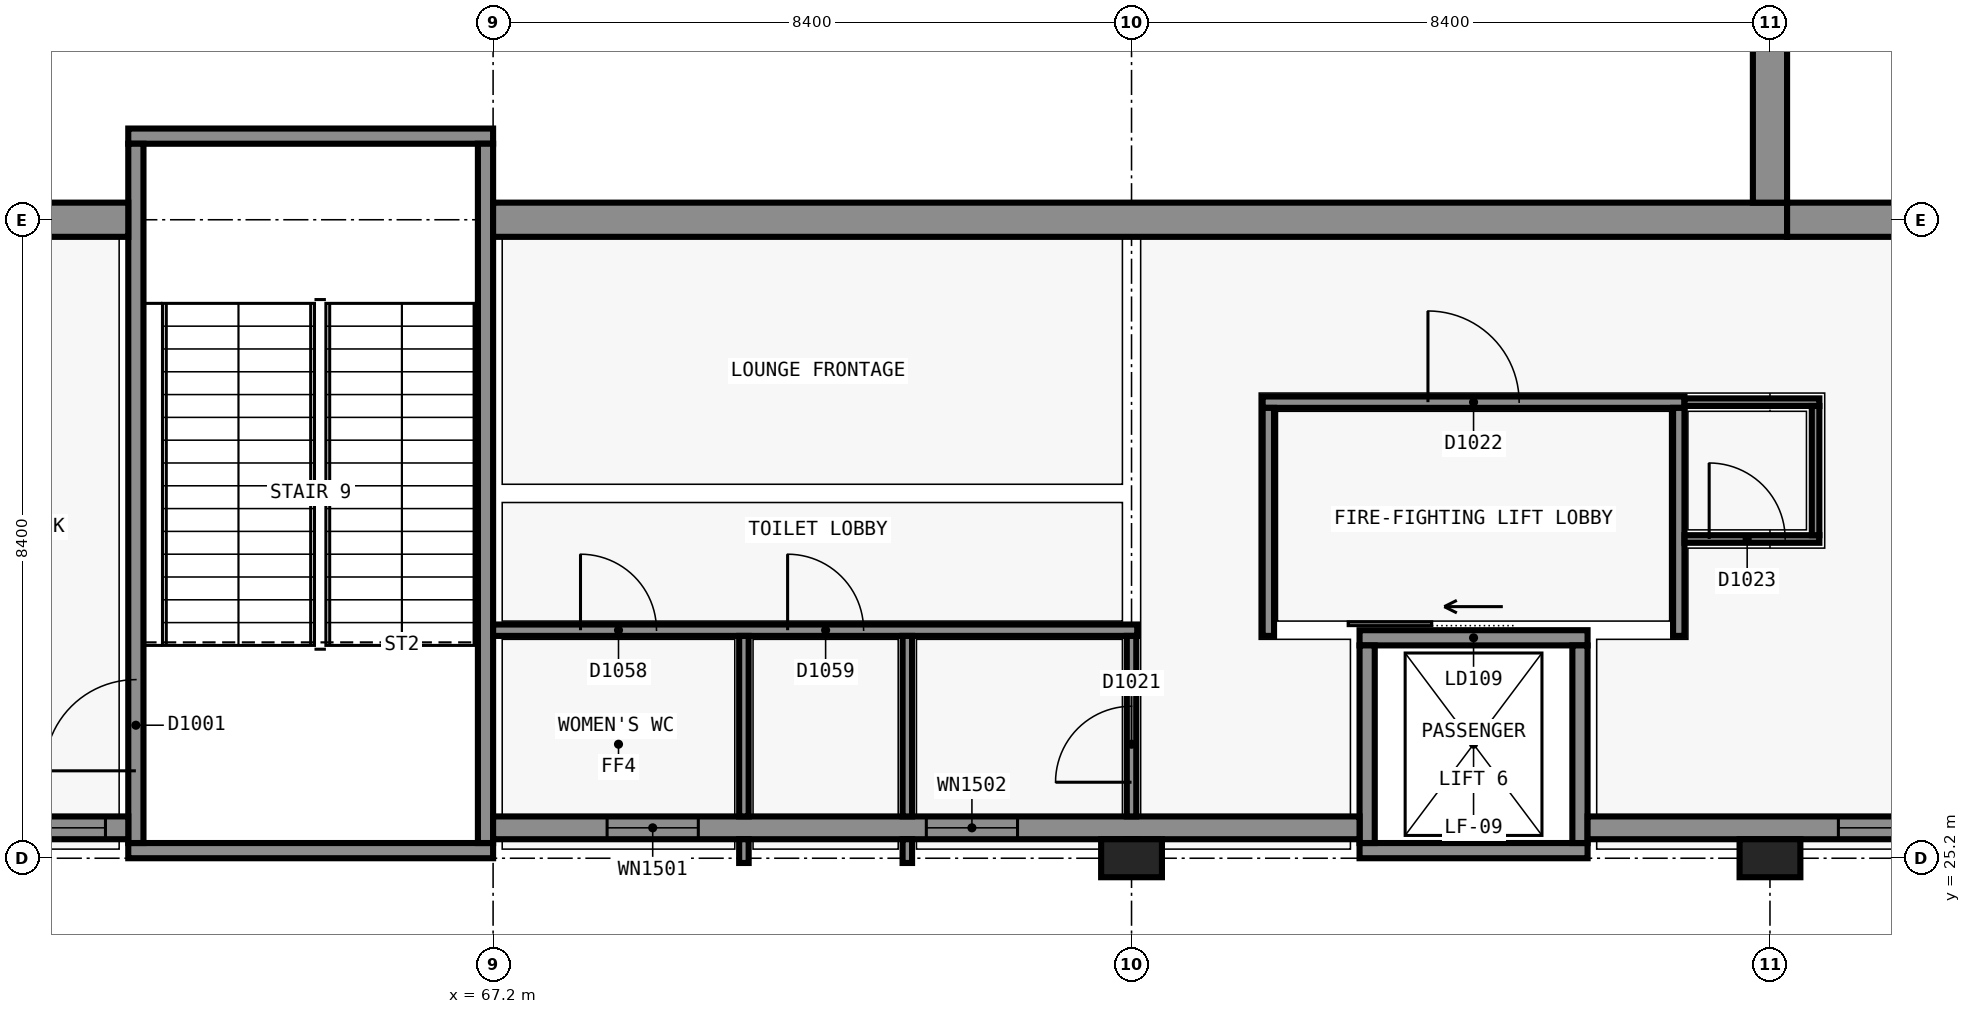
"""IFC4 building model, lengths in metres.
Left out: names, types, materials, properties, quantities, classifications, styles, units other than length and angle.
Written with IfcOpenShell. Run it as: python <this file> out.ifc"""

import sys

from ifc_helpers import new_model, si_unit, direction, frame, frame_2d, origin, origin_2d, place, context, subcontext, project, spatial, rectangle, extrude, element, fill, save


model = new_model("IFC4")
c1 = context("Model", 3, precision=1e-05, world=origin(), true_north=direction((0.0, 1.0)))
c2 = subcontext(c1, "Body", "Model", "MODEL_VIEW")
j1 = project(units=[si_unit("LENGTHUNIT", "METRE"), si_unit("PLANEANGLEUNIT", "RADIAN")], contexts=[c1])
p1 = place(None, origin())
s1 = spatial("IfcSite", under=j1, at=p1, CompositionType="ELEMENT")
p2 = place(p1, origin())
s2 = spatial("IfcBuilding", under=s1, at=p2, CompositionType="ELEMENT")
p3 = place(p2, frame((0.0, 0.0, 5.4)))
s3 = spatial("IfcBuildingStorey", under=s2, at=p3, CompositionType="ELEMENT", Elevation=5.4)
for number, where, z_axis, x_axis in (
    (1, (67.2, 25.3, 0.0), (0.0, 0.0, 1.0), (-1.0, 0.0, 0.0)),
    (2, (62.4, 34.7, 0.0), (0.0, 0.0, 1.0), (1.0, 0.0, 0.0)),
):
    element("IfcWall", number, at=place(p3, frame(where, z_axis=z_axis, x_axis=x_axis)), inside=s3, PredefinedType="SHEAR", context=c2, shape_type="SweptSolid", body=[
        extrude(rectangle(XDim=4.8, YDim=0.2, at=frame_2d((2.4, 0.0))), origin(), (0.0, 0.0, 1.0), 4.8),
    ])
p4 = place(p3, frame((62.5, 25.4, 0.0), z_axis=(0.0, 0.0, 1.0), x_axis=(0.0, 1.0, 0.0)))
e3 = element("IfcWall", 3, at=p4, inside=s3, PredefinedType="SHEAR", context=c2, shape_type="SweptSolid", body=[
    extrude(rectangle(XDim=9.2, YDim=0.2, at=frame_2d((4.6, 0.0))), origin(), (0.0, 0.0, 1.0), 4.8),
])
p5 = place(p4, frame((0.95, 0.0, 0.0)))
e4 = element("IfcOpeningElement", 4, at=p5, cuts=e3, PredefinedType="OPENING", context=c2, shape_type="SweptSolid", body=[
    extrude(rectangle(XDim=1.2, YDim=2.1, at=frame_2d((0.6, 1.05))), frame((0.0, 0.11, 0.0), z_axis=(0.0, -1.0, 0.0), x_axis=(1.0, 0.0, 0.0)), (0.0, 0.0, 1.0), 0.22),
])
p6 = place(p3, frame((67.1, 34.6, 0.0), z_axis=(0.0, 0.0, 1.0), x_axis=(0.0, -1.0, 0.0)))
e5 = element("IfcWall", 5, at=p6, inside=s3, PredefinedType="SHEAR", context=c2, shape_type="SweptSolid", body=[
    extrude(rectangle(XDim=9.2, YDim=0.2, at=frame_2d((4.6, 0.0))), origin(), (0.0, 0.0, 1.0), 4.8),
])
p7 = place(p3, frame((81.6, 25.3, 0.0), z_axis=(0.0, 0.0, 1.0), x_axis=(-1.0, 0.0, 0.0)))
e6 = element("IfcWall", 6, at=p7, inside=s3, PredefinedType="SHEAR", context=c2, shape_type="SweptSolid", body=[
    extrude(rectangle(XDim=3.0, YDim=0.2, at=frame_2d((1.5, 0.0))), origin(), (0.0, 0.0, 1.0), 4.8),
])
p8 = place(p3, frame((78.6, 28.1, 0.0), z_axis=(0.0, 0.0, 1.0), x_axis=(1.0, 0.0, 0.0)))
e7 = element("IfcWall", 7, at=p8, inside=s3, PredefinedType="SHEAR", context=c2, shape_type="SweptSolid", body=[
    extrude(rectangle(XDim=3.0, YDim=0.2, at=frame_2d((1.5, 0.0))), origin(), (0.0, 0.0, 1.0), 4.8),
])
p9 = place(p8, frame((0.95, 0.0, 0.0)))
e8 = element("IfcOpeningElement", 8, at=p9, cuts=e7, PredefinedType="OPENING", context=c2, shape_type="SweptSolid", body=[
    extrude(rectangle(XDim=1.1, YDim=2.1, at=frame_2d((0.55, 1.05))), frame((0.0, 0.11, 0.0), z_axis=(0.0, -1.0, 0.0), x_axis=(1.0, 0.0, 0.0)), (0.0, 0.0, 1.0), 0.22),
])
for number, where, z_axis, x_axis in (
    (9, (78.7, 25.4, 0.0), (0.0, 0.0, 1.0), (0.0, 1.0, 0.0)),
    (10, (81.5, 28.0, 0.0), (0.0, 0.0, 1.0), (0.0, -1.0, 0.0)),
):
    element("IfcWall", number, at=place(p3, frame(where, z_axis=z_axis, x_axis=x_axis)), inside=s3, PredefinedType="SHEAR", context=c2, shape_type="SweptSolid", body=[
        extrude(rectangle(XDim=2.6, YDim=0.2, at=frame_2d((1.3, 0.0))), origin(), (0.0, 0.0, 1.0), 4.8),
    ])
p10 = place(p3, frame((62.4, 33.6, 0.0), z_axis=(0.0, 0.0, 1.0), x_axis=(-1.0, 0.0, 0.0)))
e11 = element("IfcWall", 11, at=p10, inside=s3, PredefinedType="SHEAR", context=c2, shape_type="SweptSolid", body=[
    extrude(rectangle(XDim=3.6, YDim=0.45, at=frame_2d((1.8, 0.0))), origin(), (0.0, 0.0, 1.0), 4.8),
])
p11 = place(p3, frame((84.225, 33.6, 0.0), z_axis=(0.0, 0.0, 1.0), x_axis=(-1.0, 0.0, 0.0)))
e12 = element("IfcWall", 12, at=p11, inside=s3, PredefinedType="SHEAR", context=c2, shape_type="SweptSolid", body=[
    extrude(rectangle(XDim=17.025, YDim=0.45, at=frame_2d((8.513, 0.0))), origin(), (0.0, 0.0, 1.0), 4.8),
])
p12 = place(p3, frame((84.0, 58.575, 0.0), z_axis=(0.0, 0.0, 1.0), x_axis=(0.0, -1.0, 0.0)))
e13 = element("IfcWall", 13, at=p12, inside=s3, PredefinedType="SHEAR", context=c2, shape_type="SweptSolid", body=[
    extrude(rectangle(XDim=24.75, YDim=0.45, at=frame_2d((12.375, 0.0))), origin(), (0.0, 0.0, 1.0), 4.8),
])
p13 = place(p3, frame((96.0, 33.6, 0.0), z_axis=(0.0, 0.0, 1.0), x_axis=(-1.0, 0.0, 0.0)))
e14 = element("IfcWall", 14, at=p13, inside=s3, PredefinedType="SHEAR", context=c2, shape_type="SweptSolid", body=[
    extrude(rectangle(XDim=11.775, YDim=0.45, at=frame_2d((5.887, 0.0))), origin(), (0.0, 0.0, 1.0), 4.8),
])
for number, where, z_axis, x_axis in (
    (15, (75.6, 25.2, 0.0), (0.0, 0.0, 1.0), (1.0, 0.0, 0.0)),
    (16, (84.0, 25.2, 0.0), (0.0, 0.0, 1.0), (1.0, 0.0, 0.0)),
):
    element("IfcColumn", number, at=place(p3, frame(where, z_axis=z_axis, x_axis=x_axis)), inside=s3, PredefinedType="COLUMN", context=c2, shape_type="SweptSolid", body=[
        extrude(rectangle(XDim=0.8, YDim=0.5, at=origin_2d()), origin(), (0.0, 0.0, 1.0), 4.8),
    ])
p14 = place(p3, frame((62.4, 25.6, 0.0), z_axis=(0.0, 0.0, 1.0), x_axis=(-1.0, 0.0, 0.0)))
e17 = element("IfcWall", 17, at=p14, inside=s3, PredefinedType="SOLIDWALL", context=c2, shape_type="SweptSolid", body=[
    extrude(rectangle(XDim=3.2, YDim=0.3, at=frame_2d((1.6, 0.0))), origin(), (0.0, 0.0, 1.0), 4.5),
])
p15 = place(p14, frame((0.3, 0.0, 0.9)))
e18 = element("IfcOpeningElement", 18, at=p15, cuts=e17, PredefinedType="OPENING", context=c2, shape_type="SweptSolid", body=[
    extrude(rectangle(XDim=2.4, YDim=1.8, at=frame_2d((1.2, 0.9))), frame((0.0, 0.16, 0.0), z_axis=(0.0, -1.0, 0.0), x_axis=(1.0, 0.0, 0.0)), (0.0, 0.0, 1.0), 0.32),
])
p16 = place(p3, frame((78.6, 25.6, 0.0), z_axis=(0.0, 0.0, 1.0), x_axis=(-1.0, 0.0, 0.0)))
e19 = element("IfcWall", 19, at=p16, inside=s3, PredefinedType="SOLIDWALL", context=c2, shape_type="SweptSolid", body=[
    extrude(rectangle(XDim=11.4, YDim=0.3, at=frame_2d((5.7, 0.0))), origin(), (0.0, 0.0, 1.0), 4.5),
])
p17 = place(p16, frame((8.7, 0.0, 1.5)))
e20 = element("IfcOpeningElement", 20, at=p17, cuts=e19, PredefinedType="OPENING", context=c2, shape_type="SweptSolid", body=[
    extrude(rectangle(XDim=1.2, YDim=0.9, at=frame_2d((0.6, 0.45))), frame((0.0, 0.16, 0.0), z_axis=(0.0, -1.0, 0.0), x_axis=(1.0, 0.0, 0.0)), (0.0, 0.0, 1.0), 0.32),
])
p18 = place(p16, frame((4.5, 0.0, 1.5)))
e21 = element("IfcOpeningElement", 21, at=p18, cuts=e19, PredefinedType="OPENING", context=c2, shape_type="SweptSolid", body=[
    extrude(rectangle(XDim=1.2, YDim=0.9, at=frame_2d((0.6, 0.45))), frame((0.0, 0.16, 0.0), z_axis=(0.0, -1.0, 0.0), x_axis=(1.0, 0.0, 0.0)), (0.0, 0.0, 1.0), 0.32),
])
p19 = place(p3, frame((96.0, 25.6, 0.0), z_axis=(0.0, 0.0, 1.0), x_axis=(-1.0, 0.0, 0.0)))
e22 = element("IfcWall", 22, at=p19, inside=s3, PredefinedType="SOLIDWALL", context=c2, shape_type="SweptSolid", body=[
    extrude(rectangle(XDim=14.4, YDim=0.3, at=frame_2d((7.2, 0.0))), origin(), (0.0, 0.0, 1.0), 4.5),
])
p20 = place(p19, frame((8.7, 0.0, 0.9)))
e23 = element("IfcOpeningElement", 23, at=p20, cuts=e22, PredefinedType="OPENING", context=c2, shape_type="SweptSolid", body=[
    extrude(rectangle(XDim=2.4, YDim=1.8, at=frame_2d((1.2, 0.9))), frame((0.0, 0.16, 0.0), z_axis=(0.0, -1.0, 0.0), x_axis=(1.0, 0.0, 0.0)), (0.0, 0.0, 1.0), 0.32),
])
p21 = place(p19, frame((4.5, 0.0, 0.9)))
e24 = element("IfcOpeningElement", 24, at=p21, cuts=e22, PredefinedType="OPENING", context=c2, shape_type="SweptSolid", body=[
    extrude(rectangle(XDim=2.4, YDim=1.8, at=frame_2d((1.2, 0.9))), frame((0.0, 0.16, 0.0), z_axis=(0.0, -1.0, 0.0), x_axis=(1.0, 0.0, 0.0)), (0.0, 0.0, 1.0), 0.32),
])
p22 = place(p19, frame((0.3, 0.0, 0.9)))
e25 = element("IfcOpeningElement", 25, at=p22, cuts=e22, PredefinedType="OPENING", context=c2, shape_type="SweptSolid", body=[
    extrude(rectangle(XDim=2.4, YDim=1.8, at=frame_2d((1.2, 0.9))), frame((0.0, 0.16, 0.0), z_axis=(0.0, -1.0, 0.0), x_axis=(1.0, 0.0, 0.0)), (0.0, 0.0, 1.0), 0.32),
])
p23 = place(p3, frame((67.2, 28.2, 0.0), z_axis=(0.0, 0.0, 1.0), x_axis=(1.0, 0.0, 0.0)))
e26 = element("IfcWall", 26, at=p23, inside=s3, PredefinedType="PARTITIONING", context=c2, shape_type="SweptSolid", body=[
    extrude(rectangle(XDim=8.475, YDim=0.15, at=frame_2d((4.237, 0.0))), origin(), (0.0, 0.0, 1.0), 3.8),
])
p24 = place(p23, frame((1.15, 0.0, 0.0)))
e27 = element("IfcOpeningElement", 27, at=p24, cuts=e26, PredefinedType="OPENING", context=c2, shape_type="SweptSolid", body=[
    extrude(rectangle(XDim=1.0, YDim=2.1, at=frame_2d((0.5, 1.05))), frame((0.0, 0.085, 0.0), z_axis=(0.0, -1.0, 0.0), x_axis=(1.0, 0.0, 0.0)), (0.0, 0.0, 1.0), 0.17),
])
p25 = place(p23, frame((3.875, 0.0, 0.0)))
e28 = element("IfcOpeningElement", 28, at=p25, cuts=e26, PredefinedType="OPENING", context=c2, shape_type="SweptSolid", body=[
    extrude(rectangle(XDim=1.0, YDim=2.1, at=frame_2d((0.5, 1.05))), frame((0.0, 0.085, 0.0), z_axis=(0.0, -1.0, 0.0), x_axis=(1.0, 0.0, 0.0)), (0.0, 0.0, 1.0), 0.17),
])
p26 = place(p3, frame((77.325, 31.2, 0.0), z_axis=(0.0, 0.0, 1.0), x_axis=(1.0, 0.0, 0.0)))
e29 = element("IfcWall", 29, at=p26, inside=s3, PredefinedType="SOLIDWALL", context=c2, shape_type="SweptSolid", body=[
    extrude(rectangle(XDim=5.55, YDim=0.15, at=frame_2d((2.775, 0.0))), origin(), (0.0, 0.0, 1.0), 4.5),
])
p27 = place(p26, frame((2.175, 0.0, 0.0)))
e30 = element("IfcOpeningElement", 30, at=p27, cuts=e29, PredefinedType="OPENING", context=c2, shape_type="SweptSolid", body=[
    extrude(rectangle(XDim=1.2, YDim=2.1, at=frame_2d((0.6, 1.05))), frame((0.0, 0.085, 0.0), z_axis=(0.0, -1.0, 0.0), x_axis=(1.0, 0.0, 0.0)), (0.0, 0.0, 1.0), 0.17),
])
for number, where, z_axis, x_axis in (
    (31, (77.4, 28.125, 0.0), (0.0, 0.0, 1.0), (0.0, 1.0, 0.0)),
    (32, (82.8, 28.125, 0.0), (0.0, 0.0, 1.0), (0.0, 1.0, 0.0)),
):
    element("IfcWall", number, at=place(p3, frame(where, z_axis=z_axis, x_axis=x_axis)), inside=s3, PredefinedType="SOLIDWALL", context=c2, shape_type="SweptSolid", body=[
        extrude(rectangle(XDim=3.0, YDim=0.15, at=frame_2d((1.5, 0.0))), origin(), (0.0, 0.0, 1.0), 4.5),
    ])
p28 = place(p3, frame((70.5, 25.137, 0.0), z_axis=(0.0, 0.0, 1.0), x_axis=(0.0, 1.0, 0.0)))
e33 = element("IfcWall", 33, at=p28, inside=s3, PredefinedType="PARTITIONING", context=c2, shape_type="SweptSolid", body=[
    extrude(rectangle(XDim=0.312, YDim=0.125, at=frame_2d((0.156, 0.0))), origin(), (0.0, 0.0, 1.0), 3.8),
])
p29 = place(p3, frame((70.5, 25.75, 0.0), z_axis=(0.0, 0.0, 1.0), x_axis=(0.0, 1.0, 0.0)))
e34 = element("IfcWall", 34, at=p29, inside=s3, PredefinedType="PARTITIONING", context=c2, shape_type="SweptSolid", body=[
    extrude(rectangle(XDim=2.375, YDim=0.125, at=frame_2d((1.188, 0.0))), origin(), (0.0, 0.0, 1.0), 4.5),
])
p30 = place(p3, frame((72.65, 25.137, 0.0), z_axis=(0.0, 0.0, 1.0), x_axis=(0.0, 1.0, 0.0)))
e35 = element("IfcWall", 35, at=p30, inside=s3, PredefinedType="PARTITIONING", context=c2, shape_type="SweptSolid", body=[
    extrude(rectangle(XDim=0.312, YDim=0.125, at=frame_2d((0.156, 0.0))), origin(), (0.0, 0.0, 1.0), 3.8),
])
p31 = place(p3, frame((72.65, 25.75, 0.0), z_axis=(0.0, 0.0, 1.0), x_axis=(0.0, 1.0, 0.0)))
e36 = element("IfcWall", 36, at=p31, inside=s3, PredefinedType="PARTITIONING", context=c2, shape_type="SweptSolid", body=[
    extrude(rectangle(XDim=2.375, YDim=0.125, at=frame_2d((1.188, 0.0))), origin(), (0.0, 0.0, 1.0), 4.5),
])
p32 = place(p3, frame((75.6, 25.137, 0.0), z_axis=(0.0, 0.0, 1.0), x_axis=(0.0, 1.0, 0.0)))
e37 = element("IfcWall", 37, at=p32, inside=s3, PredefinedType="PARTITIONING", context=c2, shape_type="SweptSolid", body=[
    extrude(rectangle(XDim=0.312, YDim=0.125, at=frame_2d((0.156, 0.0))), origin(), (0.0, 0.0, 1.0), 3.8),
])
p33 = place(p3, frame((75.6, 25.75, 0.0), z_axis=(0.0, 0.0, 1.0), x_axis=(0.0, 1.0, 0.0)))
e38 = element("IfcWall", 38, at=p33, inside=s3, PredefinedType="PARTITIONING", context=c2, shape_type="SweptSolid", body=[
    extrude(rectangle(XDim=2.375, YDim=0.125, at=frame_2d((1.188, 0.0))), origin(), (0.0, 0.0, 1.0), 3.8),
])
p34 = place(p33, frame((0.45, 0.0, 0.0)))
e39 = element("IfcOpeningElement", 39, at=p34, cuts=e38, PredefinedType="OPENING", context=c2, shape_type="SweptSolid", body=[
    extrude(rectangle(XDim=1.0, YDim=2.1, at=frame_2d((0.5, 1.05))), frame((0.0, 0.073, 0.0), z_axis=(0.0, -1.0, 0.0), x_axis=(1.0, 0.0, 0.0)), (0.0, 0.0, 1.0), 0.145),
])
p35 = place(p3, frame((82.875, 29.4, 0.0), z_axis=(0.0, 0.0, 1.0), x_axis=(1.0, 0.0, 0.0)))
e40 = element("IfcWall", 40, at=p35, inside=s3, PredefinedType="PARTITIONING", context=c2, shape_type="SweptSolid", body=[
    extrude(rectangle(XDim=1.775, YDim=0.1, at=frame_2d((0.887, 0.0))), origin(), (0.0, 0.0, 1.0), 3.8),
])
p36 = place(p35, frame((0.325, 0.0, 0.0)))
e41 = element("IfcOpeningElement", 41, at=p36, cuts=e40, PredefinedType="OPENING", context=c2, shape_type="SweptSolid", body=[
    extrude(rectangle(XDim=1.0, YDim=2.1, at=frame_2d((0.5, 1.05))), frame((0.0, 0.06, 0.0), z_axis=(0.0, -1.0, 0.0), x_axis=(1.0, 0.0, 0.0)), (0.0, 0.0, 1.0), 0.12),
])
p37 = place(p3, frame((82.875, 31.2, 0.0), z_axis=(0.0, 0.0, 1.0), x_axis=(1.0, 0.0, 0.0)))
e42 = element("IfcWall", 42, at=p37, inside=s3, PredefinedType="PARTITIONING", context=c2, shape_type="SweptSolid", body=[
    extrude(rectangle(XDim=1.775, YDim=0.1, at=frame_2d((0.887, 0.0))), origin(), (0.0, 0.0, 1.0), 3.8),
])
p38 = place(p3, frame((84.6, 29.45, 0.0), z_axis=(0.0, 0.0, 1.0), x_axis=(0.0, 1.0, 0.0)))
e43 = element("IfcWall", 43, at=p38, inside=s3, PredefinedType="PARTITIONING", context=c2, shape_type="SweptSolid", body=[
    extrude(rectangle(XDim=1.7, YDim=0.1, at=frame_2d((0.85, 0.0))), origin(), (0.0, 0.0, 1.0), 4.5),
])
p39 = place(p15, origin())
e44 = element("IfcWindow", 44, at=p39, inside=s3, PartitioningType="SINGLE_PANEL", PredefinedType="WINDOW", context=c2, shape_type="SweptSolid", body=[
    extrude(rectangle(XDim=2.4, YDim=1.8, at=frame_2d((1.2, 0.9))), frame((0.0, 0.03, 0.0), z_axis=(0.0, -1.0, 0.0), x_axis=(1.0, 0.0, 0.0)), (0.0, 0.0, 1.0), 0.06),
])
fill(e18, e44)
p40 = place(p17, origin())
e45 = element("IfcWindow", 45, at=p40, inside=s3, PartitioningType="SINGLE_PANEL", PredefinedType="WINDOW", context=c2, shape_type="SweptSolid", body=[
    extrude(rectangle(XDim=1.2, YDim=0.9, at=frame_2d((0.6, 0.45))), frame((0.0, 0.03, 0.0), z_axis=(0.0, -1.0, 0.0), x_axis=(1.0, 0.0, 0.0)), (0.0, 0.0, 1.0), 0.06),
])
fill(e20, e45)
p41 = place(p18, origin())
e46 = element("IfcWindow", 46, at=p41, inside=s3, PartitioningType="SINGLE_PANEL", PredefinedType="WINDOW", context=c2, shape_type="SweptSolid", body=[
    extrude(rectangle(XDim=1.2, YDim=0.9, at=frame_2d((0.6, 0.45))), frame((0.0, 0.03, 0.0), z_axis=(0.0, -1.0, 0.0), x_axis=(1.0, 0.0, 0.0)), (0.0, 0.0, 1.0), 0.06),
])
fill(e21, e46)
p42 = place(p20, origin())
e47 = element("IfcWindow", 47, at=p42, inside=s3, PartitioningType="SINGLE_PANEL", PredefinedType="WINDOW", context=c2, shape_type="SweptSolid", body=[
    extrude(rectangle(XDim=2.4, YDim=1.8, at=frame_2d((1.2, 0.9))), frame((0.0, 0.03, 0.0), z_axis=(0.0, -1.0, 0.0), x_axis=(1.0, 0.0, 0.0)), (0.0, 0.0, 1.0), 0.06),
])
fill(e23, e47)
p43 = place(p9, origin())
e48 = element("IfcDoor", 48, at=p43, inside=s3, OperationType="SLIDING_TO_LEFT", PredefinedType="DOOR", context=c2, shape_type="SweptSolid", body=[
    extrude(rectangle(XDim=1.1, YDim=2.1, at=frame_2d((0.55, 1.05))), frame((0.0, 0.025, 0.0), z_axis=(0.0, -1.0, 0.0), x_axis=(1.0, 0.0, 0.0)), (0.0, 0.0, 1.0), 0.05),
])
fill(e8, e48)
p44 = place(p5, origin())
e49 = element("IfcDoor", 49, at=p44, inside=s3, OperationType="SINGLE_SWING_LEFT", PredefinedType="DOOR", context=c2, shape_type="SweptSolid", body=[
    extrude(rectangle(XDim=1.2, YDim=2.1, at=frame_2d((0.6, 1.05))), frame((0.0, 0.025, 0.0), z_axis=(0.0, -1.0, 0.0), x_axis=(1.0, 0.0, 0.0)), (0.0, 0.0, 1.0), 0.05),
])
fill(e4, e49)
p45 = place(p34, origin())
e50 = element("IfcDoor", 50, at=p45, inside=s3, OperationType="SINGLE_SWING_RIGHT", PredefinedType="DOOR", context=c2, shape_type="SweptSolid", body=[
    extrude(rectangle(XDim=1.0, YDim=2.1, at=frame_2d((0.5, 1.05))), frame((0.0, 0.025, 0.0), z_axis=(0.0, -1.0, 0.0), x_axis=(1.0, 0.0, 0.0)), (0.0, 0.0, 1.0), 0.05),
])
fill(e39, e50)
p46 = place(p27, origin())
e51 = element("IfcDoor", 51, at=p46, inside=s3, OperationType="SINGLE_SWING_LEFT", PredefinedType="DOOR", context=c2, shape_type="SweptSolid", body=[
    extrude(rectangle(XDim=1.2, YDim=2.1, at=frame_2d((0.6, 1.05))), frame((0.0, 0.025, 0.0), z_axis=(0.0, -1.0, 0.0), x_axis=(1.0, 0.0, 0.0)), (0.0, 0.0, 1.0), 0.05),
])
fill(e30, e51)
p47 = place(p36, origin())
e52 = element("IfcDoor", 52, at=p47, inside=s3, OperationType="SINGLE_SWING_LEFT", PredefinedType="DOOR", context=c2, shape_type="SweptSolid", body=[
    extrude(rectangle(XDim=1.0, YDim=2.1, at=frame_2d((0.5, 1.05))), frame((0.0, 0.025, 0.0), z_axis=(0.0, -1.0, 0.0), x_axis=(1.0, 0.0, 0.0)), (0.0, 0.0, 1.0), 0.05),
])
fill(e41, e52)
p48 = place(p24, origin())
e53 = element("IfcDoor", 53, at=p48, inside=s3, OperationType="SINGLE_SWING_LEFT", PredefinedType="DOOR", context=c2, shape_type="SweptSolid", body=[
    extrude(rectangle(XDim=1.0, YDim=2.1, at=frame_2d((0.5, 1.05))), frame((0.0, 0.025, 0.0), z_axis=(0.0, -1.0, 0.0), x_axis=(1.0, 0.0, 0.0)), (0.0, 0.0, 1.0), 0.05),
])
fill(e27, e53)
p49 = place(p25, origin())
e54 = element("IfcDoor", 54, at=p49, inside=s3, OperationType="SINGLE_SWING_RIGHT", PredefinedType="DOOR", context=c2, shape_type="SweptSolid", body=[
    extrude(rectangle(XDim=1.0, YDim=2.1, at=frame_2d((0.5, 1.05))), frame((0.0, 0.025, 0.0), z_axis=(0.0, -1.0, 0.0), x_axis=(1.0, 0.0, 0.0)), (0.0, 0.0, 1.0), 0.05),
])
fill(e28, e54)
save(model, sys.argv[1])
